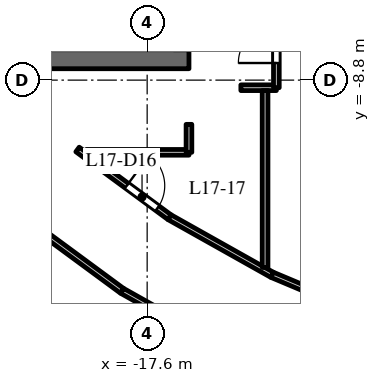
"""IFC4 building model, lengths in metres.
Left out: names, types, materials, properties, quantities, classifications, styles, units other than length and angle.
Written with IfcOpenShell. Run it as: python <this file> out.ifc"""

import sys

from ifc_helpers import new_model, si_unit, direction, frame, frame_2d, origin, place, context, subcontext, project, spatial, rectangle, extrude, element, fill, save


model = new_model("IFC4")
c1 = context("Model", 3, precision=1e-05, world=origin(), true_north=direction((0.0, 1.0)))
c2 = subcontext(c1, "Body", "Model", "MODEL_VIEW")
j1 = project(units=[si_unit("LENGTHUNIT", "METRE"), si_unit("PLANEANGLEUNIT", "RADIAN")], contexts=[c1])
p1 = place(None, origin())
s1 = spatial("IfcSite", under=j1, at=p1, CompositionType="ELEMENT")
p2 = place(p1, origin())
s2 = spatial("IfcBuilding", under=s1, at=p2, CompositionType="ELEMENT")
p3 = place(p2, frame((0.0, 0.0, 78.5)))
s3 = spatial("IfcBuildingStorey", under=s2, at=p3, CompositionType="ELEMENT", Elevation=78.5)
p4 = place(p3, frame((-16.5, -8.25, 0.0), z_axis=(0.0, 0.0, 1.0), x_axis=(-1.0, 0.0, 0.0)))
e1 = element("IfcWall", 1, at=p4, inside=s3, PredefinedType="SHEAR", context=c2, shape_type="SweptSolid", body=[
    extrude(rectangle(XDim=15.0, YDim=0.5, at=frame_2d((7.5, 0.0))), origin(), (0.0, 0.0, 1.0), 3.7),
])
p5 = place(p4, frame((6.9, 0.0, 0.0)))
e2 = element("IfcOpeningElement", 2, at=p5, cuts=e1, PredefinedType="OPENING", context=c2, shape_type="SweptSolid", body=[
    extrude(rectangle(XDim=1.2, YDim=2.1, at=frame_2d((0.6, 1.05))), frame((0.0, 0.26, 0.0), z_axis=(0.0, -1.0, 0.0), x_axis=(1.0, 0.0, 0.0)), (0.0, 0.0, 1.0), 0.52),
])
p6 = place(p4, frame((12.95, 0.0, 0.0)))
e3 = element("IfcOpeningElement", 3, at=p6, cuts=e1, PredefinedType="OPENING", context=c2, shape_type="SweptSolid", body=[
    extrude(rectangle(XDim=0.9, YDim=2.1, at=frame_2d((0.45, 1.05))), frame((0.0, 0.26, 0.0), z_axis=(0.0, -1.0, 0.0), x_axis=(1.0, 0.0, 0.0)), (0.0, 0.0, 1.0), 0.52),
])
p7 = place(p3, frame((-20.891, -12.407, 0.0), z_axis=(0.0, 0.0, 1.0), x_axis=(0.805303685339, -0.592862525701, 0.0)))
e4 = element("IfcWall", 4, at=p7, inside=s3, PredefinedType="PARTITIONING", context=c2, shape_type="SweptSolid", body=[
    extrude(rectangle(XDim=3.267, YDim=0.15, at=frame_2d((1.634, 0.0))), origin(), (0.0, 0.0, 1.0), 2.75),
])
p8 = place(p3, frame((-19.432, -10.625, 0.0), z_axis=(0.0, 0.0, 1.0), x_axis=(0.805306738654, -0.592858378265, 0.0)))
e5 = element("IfcWall", 5, at=p8, inside=s3, PredefinedType="PARTITIONING", context=c2, shape_type="SweptSolid", body=[
    extrude(rectangle(XDim=3.007, YDim=0.15, at=frame_2d((1.504, 0.0))), origin(), (0.0, 0.0, 1.0), 2.75),
])
p9 = place(p8, frame((1.607, 0.0, 0.0)))
e6 = element("IfcOpeningElement", 6, at=p9, cuts=e5, PredefinedType="OPENING", context=c2, shape_type="SweptSolid", body=[
    extrude(rectangle(XDim=1.0, YDim=2.1, at=frame_2d((0.5, 1.05))), frame((0.0, 0.085, 0.0), z_axis=(0.0, -1.0, 0.0), x_axis=(1.0, 0.0, 0.0)), (0.0, 0.0, 1.0), 0.17),
])
p10 = place(p3, frame((-19.203, -10.7, 0.0), z_axis=(0.0, 0.0, 1.0), x_axis=(1.0, 0.0, 0.0)))
e7 = element("IfcWall", 7, at=p10, inside=s3, PredefinedType="PARTITIONING", context=c2, shape_type="SweptSolid", body=[
    extrude(rectangle(XDim=2.703, YDim=0.15, at=frame_2d((1.352, 0.0))), origin(), (0.0, 0.0, 1.0), 3.7),
])
p11 = place(p3, frame((-18.26, -14.344, 0.0), z_axis=(0.0, 0.0, 1.0), x_axis=(0.871958798398, -0.489579262118, 0.0)))
e8 = element("IfcWall", 8, at=p11, inside=s3, PredefinedType="PARTITIONING", context=c2, shape_type="SweptSolid", body=[
    extrude(rectangle(XDim=3.366, YDim=0.15, at=frame_2d((1.683, 0.0))), origin(), (0.0, 0.0, 1.0), 3.7),
])
p12 = place(p3, frame((-17.01, -12.408, 0.0), z_axis=(0.0, 0.0, 1.0), x_axis=(0.871977874087, -0.489545286059, 0.0)))
e9 = element("IfcWall", 9, at=p12, inside=s3, PredefinedType="PARTITIONING", context=c2, shape_type="SweptSolid", body=[
    extrude(rectangle(XDim=3.093, YDim=0.15, at=frame_2d((1.546, 0.0))), origin(), (0.0, 0.0, 1.0), 3.7),
])
p13 = place(p3, frame((-16.5, -10.7, 0.0), z_axis=(0.0, 0.0, 1.0), x_axis=(0.0, 1.0, 0.0)))
e10 = element("IfcWall", 10, at=p13, inside=s3, PredefinedType="PARTITIONING", context=c2, shape_type="SweptSolid", body=[
    extrude(rectangle(XDim=0.736, YDim=0.15, at=frame_2d((0.368, 0.0))), origin(), (0.0, 0.0, 1.0), 3.7),
])
p14 = place(p3, frame((-15.134, -9.0, 0.0), z_axis=(0.0, 0.0, 1.0), x_axis=(1.0, 0.0, 0.0)))
e11 = element("IfcWall", 11, at=p14, inside=s3, PredefinedType="PARTITIONING", context=c2, shape_type="SweptSolid", body=[
    extrude(rectangle(XDim=0.934, YDim=0.15, at=frame_2d((0.467, 0.0))), origin(), (0.0, 0.0, 1.0), 3.7),
])
p15 = place(p3, frame((-14.497, -13.729, 0.0), z_axis=(0.0, 0.0, 1.0), x_axis=(0.0, 1.0, 0.0)))
e12 = element("IfcWall", 12, at=p15, inside=s3, PredefinedType="PARTITIONING", context=c2, shape_type="SweptSolid", body=[
    extrude(rectangle(XDim=4.654, YDim=0.15, at=frame_2d((2.327, 0.0))), origin(), (0.0, 0.0, 1.0), 2.75),
])
p16 = place(p3, frame((-14.313, -13.922, 0.0), z_axis=(0.0, 0.0, 1.0), x_axis=(0.921799502591, -0.387666966638, 0.0)))
e13 = element("IfcWall", 13, at=p16, inside=s3, PredefinedType="PARTITIONING", context=c2, shape_type="SweptSolid", body=[
    extrude(rectangle(XDim=3.19, YDim=0.15, at=frame_2d((1.595, 0.0))), origin(), (0.0, 0.0, 1.0), 2.85),
])
p17 = place(p3, frame((-14.2, -9.0, 0.0), z_axis=(0.0, 0.0, 1.0), x_axis=(0.0, 1.0, 0.0)))
e14 = element("IfcWall", 14, at=p17, inside=s3, PredefinedType="PARTITIONING", context=c2, shape_type="SweptSolid", body=[
    extrude(rectangle(XDim=10.782, YDim=0.15, at=frame_2d((5.391, 0.0))), origin(), (0.0, 0.0, 1.0), 3.7),
])
p18 = place(p17, frame((0.65, 0.0, 0.0)))
e15 = element("IfcOpeningElement", 15, at=p18, cuts=e14, PredefinedType="OPENING", context=c2, shape_type="SweptSolid", body=[
    extrude(rectangle(XDim=1.0, YDim=2.1, at=frame_2d((0.5, 1.05))), frame((0.0, 0.085, 0.0), z_axis=(0.0, -1.0, 0.0), x_axis=(1.0, 0.0, 0.0)), (0.0, 0.0, 1.0), 0.17),
])
p19 = place(p18, origin())
e16 = element("IfcDoor", 16, at=p19, inside=s3, OperationType="SINGLE_SWING_LEFT", PredefinedType="DOOR", context=c2, shape_type="SweptSolid", body=[
    extrude(rectangle(XDim=1.0, YDim=2.1, at=frame_2d((0.5, 1.05))), frame((0.0, 0.025, 0.0), z_axis=(0.0, -1.0, 0.0), x_axis=(1.0, 0.0, 0.0)), (0.0, 0.0, 1.0), 0.05),
])
fill(e15, e16)
p20 = place(p9, origin())
e17 = element("IfcDoor", 17, at=p20, inside=s3, OperationType="SINGLE_SWING_LEFT", PredefinedType="DOOR", context=c2, shape_type="SweptSolid", body=[
    extrude(rectangle(XDim=1.0, YDim=2.1, at=frame_2d((0.5, 1.05))), frame((0.0, 0.025, 0.0), z_axis=(0.0, -1.0, 0.0), x_axis=(1.0, 0.0, 0.0)), (0.0, 0.0, 1.0), 0.05),
])
fill(e6, e17)
save(model, sys.argv[1])
